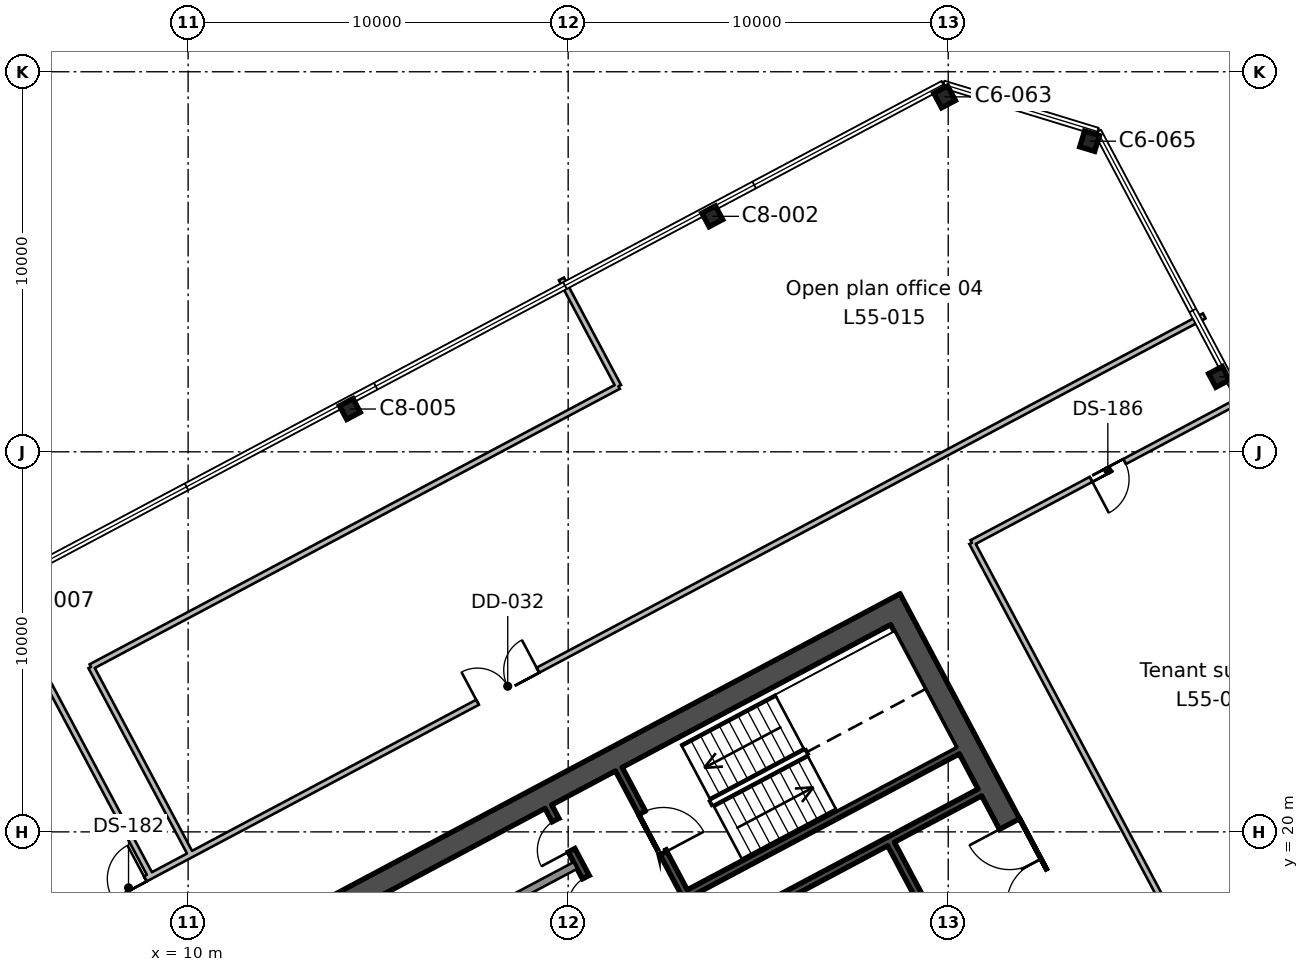
"""IFC4 building model, lengths in metres.
Left out: names, types, materials, properties, quantities, classifications, styles, units other than length and angle.
Written with IfcOpenShell. Run it as: python <this file> out.ifc"""

import sys

from ifc_helpers import new_model, si_unit, direction, frame, frame_2d, origin, origin_2d, place, context, subcontext, project, spatial, rectangle, i_section, extrude, element, fill, save


model = new_model("IFC4")
c1 = context("Model", 3, precision=1e-05, world=origin(), true_north=direction((0.0, 1.0)))
c2 = subcontext(c1, "Body", "Model", "MODEL_VIEW")
j1 = project(units=[si_unit("LENGTHUNIT", "METRE"), si_unit("PLANEANGLEUNIT", "RADIAN")], contexts=[c1])
p1 = place(None, origin())
s1 = spatial("IfcSite", under=j1, at=p1, CompositionType="ELEMENT")
p2 = place(p1, origin())
s2 = spatial("IfcBuilding", under=s1, at=p2, CompositionType="ELEMENT")
p3 = place(p2, frame((0.0, 0.0, 248.1)))
s3 = spatial("IfcBuildingStorey", under=s2, at=p3, CompositionType="ELEMENT", Elevation=248.1)
for number, where, z_axis, x_axis in (
    (1, (14.256, 31.126, 0.0), (0.0, 0.0, 1.0), (-0.883, -0.469, 0.0)),
    (2, (37.126, 31.972, 0.0), (0.0, 0.0, 1.0), (-0.469, 0.883, 0.0)),
    (3, (23.792, 36.196, 0.0), (0.0, 0.0, 1.0), (-0.883, -0.469, 0.0)),
):
    element("IfcColumn", number, at=place(p3, frame(where, z_axis=z_axis, x_axis=x_axis)), inside=s3, PredefinedType="COLUMN", context=c2, shape_type="SweptSolid", body=[
        extrude(i_section(OverallWidth=0.404, OverallDepth=0.406, WebThickness=0.027, FlangeThickness=0.044, FilletRadius=0.015, at=origin_2d()), origin(), (0.0, 0.0, 1.0), 3.9),
    ])
for number, where, z_axis, x_axis in (
    (4, (33.721, 38.173, 0.0), (0.0, 0.0, 1.0), (-0.956, 0.292, 0.0)),
    (5, (29.905, 39.34, 0.0), (0.0, 0.0, 1.0), (-0.883, -0.469, 0.0)),
):
    element("IfcColumn", number, at=place(p3, frame(where, z_axis=z_axis, x_axis=x_axis)), inside=s3, PredefinedType="COLUMN", context=c2, shape_type="SweptSolid", body=[
        extrude(i_section(OverallWidth=0.412, OverallDepth=0.434, WebThickness=0.036, FlangeThickness=0.057, FilletRadius=0.015, at=origin_2d()), origin(), (0.0, 0.0, 1.0), 3.9),
    ])
p4 = place(p3, frame((37.576, 8.994, 0.0), z_axis=(0.0, 0.0, 1.0), x_axis=(-0.469478769487, 0.88294376095, 0.0)))
e6 = element("IfcWall", 6, at=p4, inside=s3, PredefinedType="SHEAR", context=c2, shape_type="SweptSolid", body=[
    extrude(rectangle(XDim=19.4, YDim=0.6, at=frame_2d((9.7, 0.0))), origin(), (0.0, 0.0, 1.0), 3.9),
])
p5 = place(p4, frame((10.3, 0.0, 0.0)))
e7 = element("IfcOpeningElement", 7, at=p5, cuts=e6, PredefinedType="OPENING", context=c2, shape_type="SweptSolid", body=[
    extrude(rectangle(XDim=2.4, YDim=2.4, at=frame_2d((1.2, 1.2))), frame((0.0, 0.31, 0.0), z_axis=(0.0, -1.0, 0.0), x_axis=(1.0, 0.0, 0.0)), (0.0, 0.0, 1.0), 0.62),
])
p6 = place(p3, frame((10.509, 16.234, 0.0), z_axis=(0.0, 0.0, 1.0), x_axis=(0.88295010195, 0.469466843842, 0.0)))
e8 = element("IfcWall", 8, at=p6, inside=s3, PredefinedType="SHEAR", context=c2, shape_type="SweptSolid", body=[
    extrude(rectangle(XDim=20.2, YDim=0.6, at=frame_2d((10.1, 0.0))), origin(), (0.0, 0.0, 1.0), 3.9),
])
p7 = place(p3, frame((22.906, 14.218, 0.0), z_axis=(0.0, 0.0, 1.0), x_axis=(-0.469480409012, 0.88294288918, 0.0)))
e9 = element("IfcWall", 9, at=p7, inside=s3, PredefinedType="SHEAR", context=c2, shape_type="SweptSolid", body=[
    extrude(rectangle(XDim=7.3, YDim=0.2, at=frame_2d((3.65, 0.0))), origin(), (0.0, 0.0, 1.0), 3.9),
])
p8 = place(p7, frame((2.65, 0.0, 0.0)))
e10 = element("IfcOpeningElement", 10, at=p8, cuts=e9, PredefinedType="OPENING", context=c2, shape_type="SweptSolid", body=[
    extrude(rectangle(XDim=0.9, YDim=2.1, at=frame_2d((0.45, 1.05))), frame((0.0, 0.11, 0.0), z_axis=(0.0, -1.0, 0.0), x_axis=(1.0, 0.0, 0.0)), (0.0, 0.0, 1.0), 0.22),
])
p9 = place(p7, frame((4.3, 0.0, 0.0)))
e11 = element("IfcOpeningElement", 11, at=p9, cuts=e9, PredefinedType="OPENING", context=c2, shape_type="SweptSolid", body=[
    extrude(rectangle(XDim=0.9, YDim=2.1, at=frame_2d((0.45, 1.05))), frame((0.0, 0.11, 0.0), z_axis=(0.0, -1.0, 0.0), x_axis=(1.0, 0.0, 0.0)), (0.0, 0.0, 1.0), 0.22),
])
p10 = place(p7, frame((6.0, 0.0, 0.0)))
e12 = element("IfcOpeningElement", 12, at=p10, cuts=e9, PredefinedType="OPENING", context=c2, shape_type="SweptSolid", body=[
    extrude(rectangle(XDim=0.9, YDim=2.1, at=frame_2d((0.45, 1.05))), frame((0.0, 0.11, 0.0), z_axis=(0.0, -1.0, 0.0), x_axis=(1.0, 0.0, 0.0)), (0.0, 0.0, 1.0), 0.22),
])
p11 = place(p3, frame((24.76, 15.204, 0.0), z_axis=(0.0, 0.0, 1.0), x_axis=(-0.469494272526, 0.882935517501, 0.0)))
e13 = element("IfcWall", 13, at=p11, inside=s3, PredefinedType="SHEAR", context=c2, shape_type="SweptSolid", body=[
    extrude(rectangle(XDim=7.3, YDim=0.2, at=frame_2d((3.65, 0.0))), origin(), (0.0, 0.0, 1.0), 3.9),
])
p12 = place(p11, frame((4.8, 0.0, 0.0)))
e14 = element("IfcOpeningElement", 14, at=p12, cuts=e13, PredefinedType="OPENING", context=c2, shape_type="SweptSolid", body=[
    extrude(rectangle(XDim=1.2, YDim=2.1, at=frame_2d((0.6, 1.05))), frame((0.0, 0.11, 0.0), z_axis=(0.0, -1.0, 0.0), x_axis=(1.0, 0.0, 0.0)), (0.0, 0.0, 1.0), 0.22),
])
p13 = place(p3, frame((29.528, 17.739, 0.0), z_axis=(0.0, 0.0, 1.0), x_axis=(-0.469401318492, 0.882984938828, 0.0)))
e15 = element("IfcWall", 15, at=p13, inside=s3, PredefinedType="SHEAR", context=c2, shape_type="SweptSolid", body=[
    extrude(rectangle(XDim=2.2, YDim=0.2, at=frame_2d((1.1, 0.0))), origin(), (0.0, 0.0, 1.0), 3.9),
])
p14 = place(p3, frame((23.769, 17.282, 0.0), z_axis=(0.0, 0.0, 1.0), x_axis=(0.882940221191, 0.469485426614, 0.0)))
e16 = element("IfcWall", 16, at=p14, inside=s3, PredefinedType="SHEAR", context=c2, shape_type="SweptSolid", body=[
    extrude(rectangle(XDim=8.0, YDim=0.2, at=frame_2d((4.0, 0.0))), origin(), (0.0, 0.0, 1.0), 3.9),
])
p15 = place(p3, frame((23.182, 18.385, 0.0), z_axis=(0.0, 0.0, 1.0), x_axis=(0.88295287151, 0.469461634952, 0.0)))
e17 = element("IfcWall", 17, at=p15, inside=s3, PredefinedType="SHEAR", context=c2, shape_type="SweptSolid", body=[
    extrude(rectangle(XDim=8.0, YDim=0.2, at=frame_2d((4.0, 0.0))), origin(), (0.0, 0.0, 1.0), 3.9),
])
p16 = place(p3, frame((15.598, 16.674, 0.0), z_axis=(0.0, 0.0, 1.0), x_axis=(0.882934506056, 0.469496174655, 0.0)))
e18 = element("IfcWall", 18, at=p16, inside=s3, PredefinedType="SOLIDWALL", context=c2, shape_type="SweptSolid", body=[
    extrude(rectangle(XDim=5.2, YDim=0.2, at=frame_2d((2.6, 0.0))), origin(), (0.0, 0.0, 1.0), 3.9),
])
p17 = place(p3, frame((0.0, 14.044, 0.0), z_axis=(0.0, 0.0, 1.0), x_axis=(0.882962129795, 0.469444221764, 0.0)))
e19 = element("IfcWall", 19, at=p17, inside=s3, PredefinedType="PARTITIONING", context=c2, shape_type="SweptSolid", body=[
    extrude(rectangle(XDim=41.607, YDim=0.15, at=frame_2d((20.803, 0.0))), origin(), (0.0, 0.0, 1.0), 3.45),
])
p18 = place(p17, frame((19.95, 0.0, 0.0)))
e20 = element("IfcOpeningElement", 20, at=p18, cuts=e19, PredefinedType="OPENING", context=c2, shape_type="SweptSolid", body=[
    extrude(rectangle(XDim=1.8, YDim=2.1, at=frame_2d((0.9, 1.05))), frame((0.0, 0.085, 0.0), z_axis=(0.0, -1.0, 0.0), x_axis=(1.0, 0.0, 0.0)), (0.0, 0.0, 1.0), 0.17),
])
p19 = place(p17, frame((9.05, 0.0, 0.0)))
e21 = element("IfcOpeningElement", 21, at=p19, cuts=e19, PredefinedType="OPENING", context=c2, shape_type="SweptSolid", body=[
    extrude(rectangle(XDim=1.0, YDim=2.1, at=frame_2d((0.5, 1.05))), frame((0.0, 0.085, 0.0), z_axis=(0.0, -1.0, 0.0), x_axis=(1.0, 0.0, 0.0)), (0.0, 0.0, 1.0), 0.17),
])
p20 = place(p3, frame((4.885, 26.608, 0.0), z_axis=(0.0, 0.0, 1.0), x_axis=(0.469445946219, -0.882961212952, 0.0)))
e22 = element("IfcWall", 22, at=p20, inside=s3, PredefinedType="PARTITIONING", context=c2, shape_type="SweptSolid", body=[
    extrude(rectangle(XDim=8.8, YDim=0.15, at=frame_2d((4.4, 0.0))), origin(), (0.0, 0.0, 1.0), 3.45),
])
p21 = place(p3, frame((10.072, 19.399, 0.0), z_axis=(0.0, 0.0, 1.0), x_axis=(-0.469483537511, 0.882941225681, 0.0)))
e23 = element("IfcWall", 23, at=p21, inside=s3, PredefinedType="PARTITIONING", context=c2, shape_type="SweptSolid", body=[
    extrude(rectangle(XDim=5.6, YDim=0.15, at=frame_2d((2.8, 0.0))), origin(), (0.0, 0.0, 1.0), 3.45),
])
p22 = place(p3, frame((7.443, 24.343, 0.0), z_axis=(0.0, 0.0, 1.0), x_axis=(0.882933890587, 0.469497332104, 0.0)))
e24 = element("IfcWall", 24, at=p22, inside=s3, PredefinedType="PARTITIONING", context=c2, shape_type="SweptSolid", body=[
    extrude(rectangle(XDim=15.721, YDim=0.15, at=frame_2d((7.861, 0.0))), origin(), (0.0, 0.0, 1.0), 3.45),
])
p23 = place(p3, frame((21.324, 31.724, 0.0), z_axis=(0.0, 0.0, 1.0), x_axis=(-0.469320691295, 0.883027796121, 0.0)))
e25 = element("IfcWall", 25, at=p23, inside=s3, PredefinedType="PARTITIONING", context=c2, shape_type="SweptSolid", body=[
    extrude(rectangle(XDim=3.2, YDim=0.15, at=frame_2d((1.6, 0.0))), origin(), (0.0, 0.0, 1.0), 3.45),
])
p24 = place(p3, frame((37.864, 31.458, 0.0), z_axis=(0.0, 0.0, 1.0), x_axis=(-0.882947223068, -0.469472258261, 0.0)))
e26 = element("IfcWall", 26, at=p24, inside=s3, PredefinedType="PARTITIONING", context=c2, shape_type="SweptSolid", body=[
    extrude(rectangle(XDim=8.201, YDim=0.15, at=frame_2d((4.101, 0.0))), origin(), (0.0, 0.0, 1.0), 3.45),
])
p25 = place(p24, frame((3.65, 0.0, 0.0)))
e27 = element("IfcOpeningElement", 27, at=p25, cuts=e26, PredefinedType="OPENING", context=c2, shape_type="SweptSolid", body=[
    extrude(rectangle(XDim=1.0, YDim=2.1, at=frame_2d((0.5, 1.05))), frame((0.0, 0.085, 0.0), z_axis=(0.0, -1.0, 0.0), x_axis=(1.0, 0.0, 0.0)), (0.0, 0.0, 1.0), 0.17),
])
p26 = place(p3, frame((30.623, 27.608, 0.0), z_axis=(0.0, 0.0, 1.0), x_axis=(0.469489882812, -0.882937851685, 0.0)))
e28 = element("IfcWall", 28, at=p26, inside=s3, PredefinedType="PARTITIONING", context=c2, shape_type="SweptSolid", body=[
    extrude(rectangle(XDim=20.0, YDim=0.15, at=frame_2d((10.0, 0.0))), origin(), (0.0, 0.0, 1.0), 3.45),
])
p27 = place(p5, origin())
e29 = element("IfcDoor", 29, at=p27, inside=s3, OperationType="DOUBLE_DOOR_SINGLE_SWING", PredefinedType="DOOR", context=c2, shape_type="SweptSolid", body=[
    extrude(rectangle(XDim=2.4, YDim=2.4, at=frame_2d((1.2, 1.2))), frame((0.0, 0.025, 0.0), z_axis=(0.0, -1.0, 0.0), x_axis=(1.0, 0.0, 0.0)), (0.0, 0.0, 1.0), 0.05),
])
fill(e7, e29)
p28 = place(p12, frame((1.2, 0.0, 0.0), z_axis=(0.0, 0.0, 1.0), x_axis=(-1.0, 0.0, 0.0)))
e30 = element("IfcDoor", 30, at=p28, inside=s3, OperationType="SINGLE_SWING_RIGHT", PredefinedType="DOOR", context=c2, shape_type="SweptSolid", body=[
    extrude(rectangle(XDim=1.2, YDim=2.1, at=frame_2d((0.6, 1.05))), frame((0.0, 0.025, 0.0), z_axis=(0.0, -1.0, 0.0), x_axis=(1.0, 0.0, 0.0)), (0.0, 0.0, 1.0), 0.05),
])
fill(e14, e30)
p29 = place(p9, origin())
e31 = element("IfcDoor", 31, at=p29, inside=s3, OperationType="SINGLE_SWING_LEFT", PredefinedType="DOOR", context=c2, shape_type="SweptSolid", body=[
    extrude(rectangle(XDim=0.9, YDim=2.1, at=frame_2d((0.45, 1.05))), frame((0.0, 0.025, 0.0), z_axis=(0.0, -1.0, 0.0), x_axis=(1.0, 0.0, 0.0)), (0.0, 0.0, 1.0), 0.05),
])
fill(e11, e31)
p30 = place(p10, origin())
e32 = element("IfcDoor", 32, at=p30, inside=s3, OperationType="SINGLE_SWING_LEFT", PredefinedType="DOOR", context=c2, shape_type="SweptSolid", body=[
    extrude(rectangle(XDim=0.9, YDim=2.1, at=frame_2d((0.45, 1.05))), frame((0.0, 0.025, 0.0), z_axis=(0.0, -1.0, 0.0), x_axis=(1.0, 0.0, 0.0)), (0.0, 0.0, 1.0), 0.05),
])
fill(e12, e32)
p31 = place(p18, origin())
e33 = element("IfcDoor", 33, at=p31, inside=s3, OperationType="DOUBLE_DOOR_SINGLE_SWING", PredefinedType="DOOR", context=c2, shape_type="SweptSolid", body=[
    extrude(rectangle(XDim=1.8, YDim=2.1, at=frame_2d((0.9, 1.05))), frame((0.0, 0.025, 0.0), z_axis=(0.0, -1.0, 0.0), x_axis=(1.0, 0.0, 0.0)), (0.0, 0.0, 1.0), 0.05),
])
fill(e20, e33)
p32 = place(p19, origin())
e34 = element("IfcDoor", 34, at=p32, inside=s3, OperationType="SINGLE_SWING_RIGHT", PredefinedType="DOOR", context=c2, shape_type="SweptSolid", body=[
    extrude(rectangle(XDim=1.0, YDim=2.1, at=frame_2d((0.5, 1.05))), frame((0.0, 0.025, 0.0), z_axis=(0.0, -1.0, 0.0), x_axis=(1.0, 0.0, 0.0)), (0.0, 0.0, 1.0), 0.05),
])
fill(e21, e34)
p33 = place(p25, origin())
e35 = element("IfcDoor", 35, at=p33, inside=s3, OperationType="SINGLE_SWING_RIGHT", PredefinedType="DOOR", context=c2, shape_type="SweptSolid", body=[
    extrude(rectangle(XDim=1.0, YDim=2.1, at=frame_2d((0.5, 1.05))), frame((0.0, 0.025, 0.0), z_axis=(0.0, -1.0, 0.0), x_axis=(1.0, 0.0, 0.0)), (0.0, 0.0, 1.0), 0.05),
])
fill(e27, e35)
save(model, sys.argv[1])
